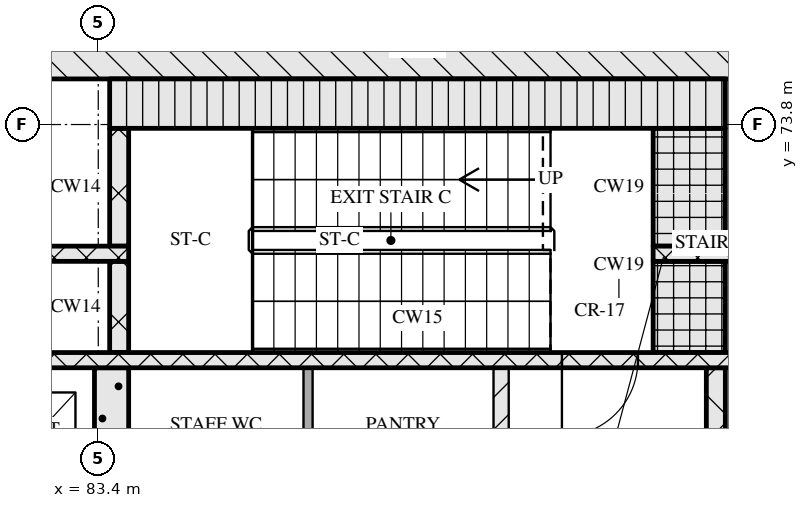
"""IFC4 building model, lengths in metres.
Left out: names, types, materials, properties, quantities, classifications, styles, units other than length and angle.
Written with IfcOpenShell. Run it as: python <this file> out.ifc"""

import sys

from ifc_helpers import new_model, si_unit, direction, frame, frame_2d, origin, place, context, subcontext, project, spatial, rectangle, extrude, element, fill, save


model = new_model("IFC4")
c1 = context("Model", 3, precision=1e-05, world=origin(), true_north=direction((0.0, 1.0)))
c2 = subcontext(c1, "Body", "Model", "MODEL_VIEW")
j1 = project(units=[si_unit("LENGTHUNIT", "METRE"), si_unit("PLANEANGLEUNIT", "RADIAN")], contexts=[c1])
p1 = place(None, origin())
s1 = spatial("IfcSite", under=j1, at=p1, CompositionType="ELEMENT")
p2 = place(p1, origin())
s2 = spatial("IfcBuilding", under=s1, at=p2, CompositionType="ELEMENT")
p3 = place(p2, frame((0.0, 0.0, 142.05)))
s3 = spatial("IfcBuildingStorey", under=s2, at=p3, CompositionType="ELEMENT", Elevation=142.05)
p4 = place(p3, frame((67.0, 74.8, 0.0), z_axis=(0.0, 0.0, 1.0), x_axis=(1.0, 0.0, 0.0)))
e1 = element("IfcWall", 1, at=p4, inside=s3, PredefinedType="SOLIDWALL", context=c2, shape_type="SweptSolid", body=[
    extrude(rectangle(XDim=41.2, YDim=0.8, at=frame_2d((20.6, 0.0))), origin(), (0.0, 0.0, 1.0), 5.12),
])
p5 = place(p3, frame((83.575, 68.0, 0.0), z_axis=(0.0, 0.0, 1.0), x_axis=(0.0, 1.0, 0.0)))
e2 = element("IfcWall", 2, at=p5, inside=s3, PredefinedType="SOLIDWALL", context=c2, shape_type="SweptSolid", body=[
    extrude(rectangle(XDim=2.6, YDim=0.45, at=frame_2d((1.3, 0.0))), origin(), (0.0, 0.0, 1.0), 5.12),
])
p6 = place(p3, frame((86.16, 68.0, 0.0), z_axis=(0.0, 0.0, 1.0), x_axis=(0.0, 1.0, 0.0)))
e3 = element("IfcWall", 3, at=p6, inside=s3, PredefinedType="PARTITIONING", context=c2, shape_type="SweptSolid", body=[
    extrude(rectangle(XDim=2.6, YDim=0.12, at=frame_2d((1.3, 0.0))), origin(), (0.0, 0.0, 1.0), 5.12),
])
p7 = place(p3, frame((88.7, 68.0, 0.0), z_axis=(0.0, 0.0, 1.0), x_axis=(0.0, 1.0, 0.0)))
e4 = element("IfcWall", 4, at=p7, inside=s3, PredefinedType="PARTITIONING", context=c2, shape_type="SweptSolid", body=[
    extrude(rectangle(XDim=2.6, YDim=0.2, at=frame_2d((1.3, 0.0))), origin(), (0.0, 0.0, 1.0), 5.12),
])
p8 = place(p3, frame((91.525, 68.0, 0.0), z_axis=(0.0, 0.0, 1.0), x_axis=(0.0, 1.0, 0.0)))
e5 = element("IfcWall", 5, at=p8, inside=s3, PredefinedType="SOLIDWALL", context=c2, shape_type="SweptSolid", body=[
    extrude(rectangle(XDim=2.6, YDim=0.25, at=frame_2d((1.3, 0.0))), origin(), (0.0, 0.0, 1.0), 5.12),
])
p9 = place(p3, frame((67.8, 70.7, 0.0), z_axis=(0.0, 0.0, 1.0), x_axis=(1.0, 0.0, 0.0)))
e6 = element("IfcWall", 6, at=p9, inside=s3, PredefinedType="SOLIDWALL", context=c2, shape_type="SweptSolid", body=[
    extrude(rectangle(XDim=39.6, YDim=0.2, at=frame_2d((19.8, 0.0))), origin(), (0.0, 0.0, 1.0), 5.12),
])
p10 = place(p9, frame((0.65, 0.0, 0.0)))
e7 = element("IfcOpeningElement", 7, at=p10, cuts=e6, PredefinedType="OPENING", context=c2, shape_type="SweptSolid", body=[
    extrude(rectangle(XDim=1.1, YDim=2.1, at=frame_2d((0.55, 1.05))), frame((0.0, 0.11, 0.0), z_axis=(0.0, -1.0, 0.0), x_axis=(1.0, 0.0, 0.0)), (0.0, 0.0, 1.0), 0.22),
])
p11 = place(p9, frame((3.25, 0.0, 0.0)))
e8 = element("IfcOpeningElement", 8, at=p11, cuts=e6, PredefinedType="OPENING", context=c2, shape_type="SweptSolid", body=[
    extrude(rectangle(XDim=1.1, YDim=2.1, at=frame_2d((0.55, 1.05))), frame((0.0, 0.11, 0.0), z_axis=(0.0, -1.0, 0.0), x_axis=(1.0, 0.0, 0.0)), (0.0, 0.0, 1.0), 0.22),
])
p12 = place(p9, frame((5.9, 0.0, 0.0)))
e9 = element("IfcOpeningElement", 9, at=p12, cuts=e6, PredefinedType="OPENING", context=c2, shape_type="SweptSolid", body=[
    extrude(rectangle(XDim=1.0, YDim=2.1, at=frame_2d((0.5, 1.05))), frame((0.0, 0.11, 0.0), z_axis=(0.0, -1.0, 0.0), x_axis=(1.0, 0.0, 0.0)), (0.0, 0.0, 1.0), 0.22),
])
p13 = place(p9, frame((21.7, 0.0, 0.0)))
e10 = element("IfcOpeningElement", 10, at=p13, cuts=e6, PredefinedType="OPENING", context=c2, shape_type="SweptSolid", body=[
    extrude(rectangle(XDim=1.0, YDim=2.1, at=frame_2d((0.5, 1.05))), frame((0.0, 0.11, 0.0), z_axis=(0.0, -1.0, 0.0), x_axis=(1.0, 0.0, 0.0)), (0.0, 0.0, 1.0), 0.22),
])
p14 = place(p9, frame((32.7, 0.0, 0.0)))
e11 = element("IfcOpeningElement", 11, at=p14, cuts=e6, PredefinedType="OPENING", context=c2, shape_type="SweptSolid", body=[
    extrude(rectangle(XDim=1.0, YDim=2.1, at=frame_2d((0.5, 1.05))), frame((0.0, 0.11, 0.0), z_axis=(0.0, -1.0, 0.0), x_axis=(1.0, 0.0, 0.0)), (0.0, 0.0, 1.0), 0.22),
])
p15 = place(p9, frame((35.25, 0.0, 0.0)))
e12 = element("IfcOpeningElement", 12, at=p15, cuts=e6, PredefinedType="OPENING", context=c2, shape_type="SweptSolid", body=[
    extrude(rectangle(XDim=1.1, YDim=2.1, at=frame_2d((0.55, 1.05))), frame((0.0, 0.11, 0.0), z_axis=(0.0, -1.0, 0.0), x_axis=(1.0, 0.0, 0.0)), (0.0, 0.0, 1.0), 0.22),
])
p16 = place(p9, frame((37.85, 0.0, 0.0)))
e13 = element("IfcOpeningElement", 13, at=p16, cuts=e6, PredefinedType="OPENING", context=c2, shape_type="SweptSolid", body=[
    extrude(rectangle(XDim=1.1, YDim=2.1, at=frame_2d((0.55, 1.05))), frame((0.0, 0.11, 0.0), z_axis=(0.0, -1.0, 0.0), x_axis=(1.0, 0.0, 0.0)), (0.0, 0.0, 1.0), 0.22),
])
p17 = place(p3, frame((83.675, 70.8, 0.0), z_axis=(0.0, 0.0, 1.0), x_axis=(0.0, 1.0, 0.0)))
e14 = element("IfcWall", 14, at=p17, inside=s3, PredefinedType="SOLIDWALL", context=c2, shape_type="SweptSolid", body=[
    extrude(rectangle(XDim=1.2, YDim=0.25, at=frame_2d((0.6, 0.0))), origin(), (0.0, 0.0, 1.0), 5.12),
])
p18 = place(p3, frame((91.175, 70.8, 0.0), z_axis=(0.0, 0.0, 1.0), x_axis=(0.0, 1.0, 0.0)))
e15 = element("IfcWall", 15, at=p18, inside=s3, PredefinedType="SOLIDWALL", context=c2, shape_type="SweptSolid", body=[
    extrude(rectangle(XDim=1.2, YDim=0.95, at=frame_2d((0.6, 0.0))), origin(), (0.0, 0.0, 1.0), 5.12),
])
p19 = place(p3, frame((72.8, 72.1, 0.0), z_axis=(0.0, 0.0, 1.0), x_axis=(1.0, 0.0, 0.0)))
e16 = element("IfcWall", 16, at=p19, inside=s3, PredefinedType="SOLIDWALL", context=c2, shape_type="SweptSolid", body=[
    extrude(rectangle(XDim=11.0, YDim=0.2, at=frame_2d((5.5, 0.0))), origin(), (0.0, 0.0, 1.0), 5.12),
])
p20 = place(p19, frame((1.25, 0.0, 0.0)))
e17 = element("IfcOpeningElement", 17, at=p20, cuts=e16, PredefinedType="OPENING", context=c2, shape_type="SweptSolid", body=[
    extrude(rectangle(XDim=0.9, YDim=2.1, at=frame_2d((0.45, 1.05))), frame((0.0, 0.11, 0.0), z_axis=(0.0, -1.0, 0.0), x_axis=(1.0, 0.0, 0.0)), (0.0, 0.0, 1.0), 0.22),
])
p21 = place(p19, frame((6.475, 0.0, 0.0)))
e18 = element("IfcOpeningElement", 18, at=p21, cuts=e16, PredefinedType="OPENING", context=c2, shape_type="SweptSolid", body=[
    extrude(rectangle(XDim=1.2, YDim=2.1, at=frame_2d((0.6, 1.05))), frame((0.0, 0.11, 0.0), z_axis=(0.0, -1.0, 0.0), x_axis=(1.0, 0.0, 0.0)), (0.0, 0.0, 1.0), 0.22),
])
p22 = place(p3, frame((90.7, 72.1, 0.0), z_axis=(0.0, 0.0, 1.0), x_axis=(1.0, 0.0, 0.0)))
e19 = element("IfcWall", 19, at=p22, inside=s3, PredefinedType="SOLIDWALL", context=c2, shape_type="SweptSolid", body=[
    extrude(rectangle(XDim=11.7, YDim=0.2, at=frame_2d((5.85, 0.0))), origin(), (0.0, 0.0, 1.0), 5.12),
])
p23 = place(p22, frame((4.025, 0.0, 0.0)))
e20 = element("IfcOpeningElement", 20, at=p23, cuts=e19, PredefinedType="OPENING", context=c2, shape_type="SweptSolid", body=[
    extrude(rectangle(XDim=1.2, YDim=2.1, at=frame_2d((0.6, 1.05))), frame((0.0, 0.11, 0.0), z_axis=(0.0, -1.0, 0.0), x_axis=(1.0, 0.0, 0.0)), (0.0, 0.0, 1.0), 0.22),
])
p24 = place(p22, frame((9.55, 0.0, 0.0)))
e21 = element("IfcOpeningElement", 21, at=p24, cuts=e19, PredefinedType="OPENING", context=c2, shape_type="SweptSolid", body=[
    extrude(rectangle(XDim=0.9, YDim=2.1, at=frame_2d((0.45, 1.05))), frame((0.0, 0.11, 0.0), z_axis=(0.0, -1.0, 0.0), x_axis=(1.0, 0.0, 0.0)), (0.0, 0.0, 1.0), 0.22),
])
p25 = place(p3, frame((83.675, 72.2, 0.0), z_axis=(0.0, 0.0, 1.0), x_axis=(0.0, 1.0, 0.0)))
e22 = element("IfcWall", 22, at=p25, inside=s3, PredefinedType="SOLIDWALL", context=c2, shape_type="SweptSolid", body=[
    extrude(rectangle(XDim=1.55, YDim=0.25, at=frame_2d((0.775, 0.0))), origin(), (0.0, 0.0, 1.0), 5.12),
])
p26 = place(p3, frame((91.175, 72.2, 0.0), z_axis=(0.0, 0.0, 1.0), x_axis=(0.0, 1.0, 0.0)))
e23 = element("IfcWall", 23, at=p26, inside=s3, PredefinedType="SOLIDWALL", context=c2, shape_type="SweptSolid", body=[
    extrude(rectangle(XDim=1.55, YDim=0.95, at=frame_2d((0.775, 0.0))), origin(), (0.0, 0.0, 1.0), 5.12),
])
p27 = place(p3, frame((83.55, 74.075, 0.0), z_axis=(0.0, 0.0, 1.0), x_axis=(1.0, 0.0, 0.0)))
e24 = element("IfcWall", 24, at=p27, inside=s3, PredefinedType="SOLIDWALL", context=c2, shape_type="SweptSolid", body=[
    extrude(rectangle(XDim=8.1, YDim=0.65, at=frame_2d((4.05, 0.0))), origin(), (0.0, 0.0, 1.0), 5.12),
])
p28 = place(p13, origin())
e25 = element("IfcDoor", 25, at=p28, inside=s3, OperationType="SINGLE_SWING_RIGHT", PredefinedType="DOOR", context=c2, shape_type="SweptSolid", body=[
    extrude(rectangle(XDim=1.0, YDim=2.1, at=frame_2d((0.5, 1.05))), frame((0.0, 0.025, 0.0), z_axis=(0.0, -1.0, 0.0), x_axis=(1.0, 0.0, 0.0)), (0.0, 0.0, 1.0), 0.05),
])
fill(e10, e25)
save(model, sys.argv[1])
